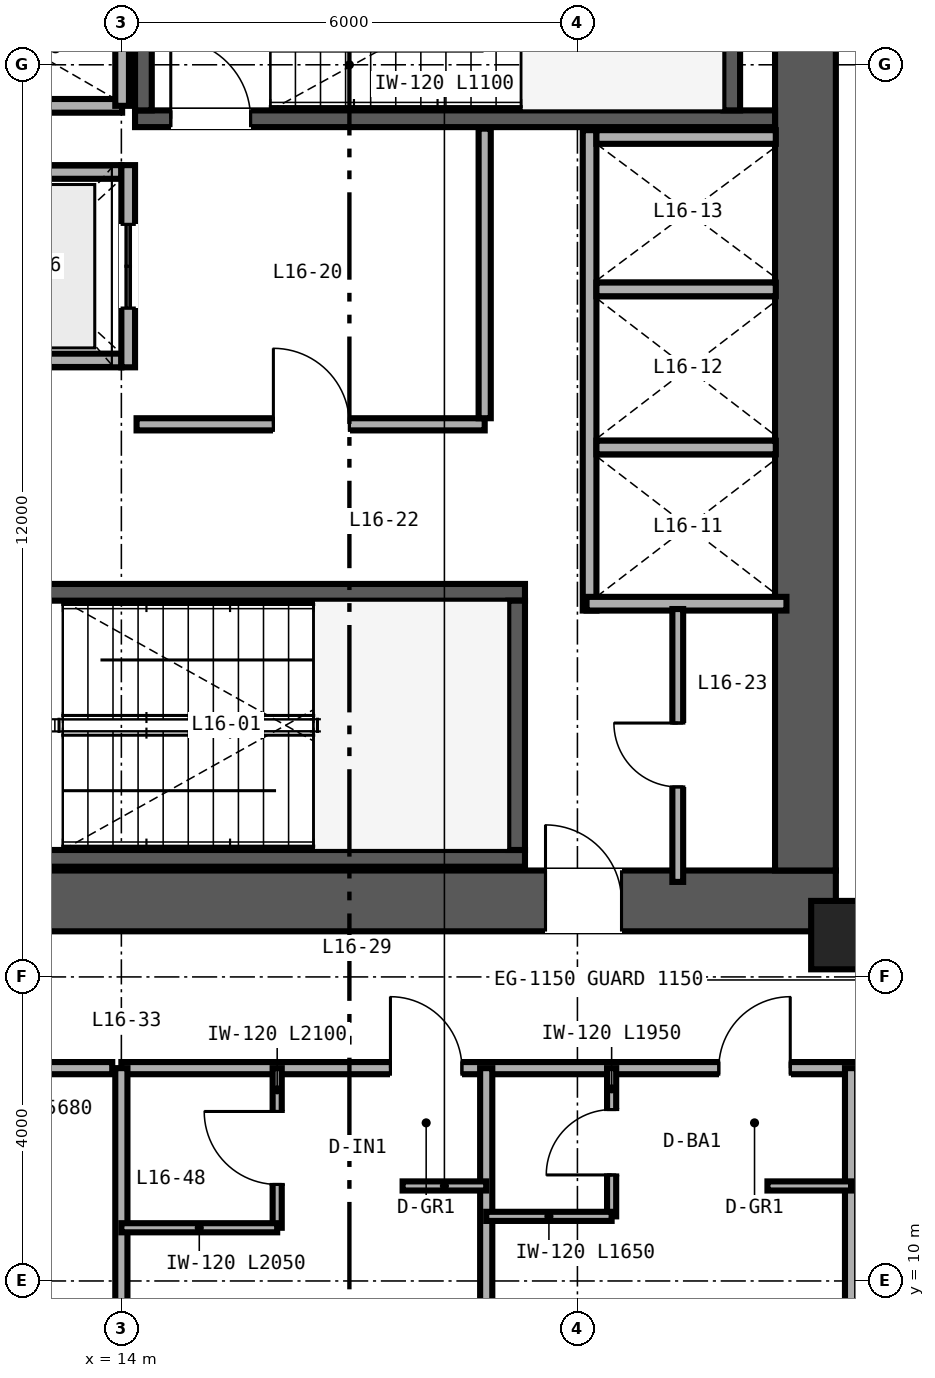
"""IFC4 building model, lengths in metres.
Left out: names, types, materials, properties, quantities, classifications, styles, units other than length and angle.
Written with IfcOpenShell. Run it as: python <this file> out.ifc"""

import sys

from ifc_helpers import new_model, si_unit, direction, frame, frame_2d, origin, origin_2d, place, context, subcontext, project, spatial, rectangle, hollow_rectangle, extrude, source, transform, mapped, element, fill, save


model = new_model("IFC4")
c1 = context("Model", 3, precision=1e-05, world=origin(), true_north=direction((0.0, 1.0)))
c2 = subcontext(c1, "Body", "Model", "MODEL_VIEW")
j1 = project(units=[si_unit("LENGTHUNIT", "METRE"), si_unit("PLANEANGLEUNIT", "RADIAN")], contexts=[c1])
p1 = place(None, origin())
s1 = spatial("IfcSite", under=j1, at=p1, CompositionType="ELEMENT")
p2 = place(p1, origin())
s2 = spatial("IfcBuilding", under=s1, at=p2, CompositionType="ELEMENT")
p3 = place(p2, frame((0.0, 0.0, 67.2)))
s3 = spatial("IfcBuildingStorey", under=s2, at=p3, CompositionType="ELEMENT", Elevation=67.2)
p4 = place(p3, frame((10.6, 15.0, 0.0), z_axis=(0.0, 0.0, 1.0), x_axis=(1.0, 0.0, 0.0)))
e1 = element("IfcWall", 1, at=p4, inside=s3, PredefinedType="SHEAR", context=c2, shape_type="SweptSolid", body=[
    extrude(rectangle(XDim=12.8, YDim=0.8, at=frame_2d((6.4, 0.0))), origin(), (0.0, 0.0, 1.0), 3.35),
])
p5 = place(p4, frame((8.98, 0.0, 0.0)))
e2 = element("IfcOpeningElement", 2, at=p5, cuts=e1, PredefinedType="OPENING", context=c2, shape_type="SweptSolid", body=[
    extrude(rectangle(XDim=1.0, YDim=2.15, at=frame_2d((0.5, 1.075))), frame((0.0, 0.41, 0.0), z_axis=(0.0, -1.0, 0.0), x_axis=(1.0, 0.0, 0.0)), (0.0, 0.0, 1.0), 0.82),
])
p6 = place(p3, frame((23.0, 15.4, 0.0), z_axis=(0.0, 0.0, 1.0), x_axis=(0.0, 1.0, 0.0)))
e3 = element("IfcWall", 3, at=p6, inside=s3, PredefinedType="SHEAR", context=c2, shape_type="SweptSolid", body=[
    extrude(rectangle(XDim=21.2, YDim=0.8, at=frame_2d((10.6, 0.0))), origin(), (0.0, 0.0, 1.0), 3.35),
])
p7 = place(p3, frame((11.4, 15.56, 0.0), z_axis=(0.0, 0.0, 1.0), x_axis=(1.0, 0.0, 0.0)))
e4 = element("IfcWall", 4, at=p7, inside=s3, PredefinedType="SHEAR", context=c2, shape_type="SweptSolid", body=[
    extrude(rectangle(XDim=7.91, YDim=0.22, at=frame_2d((3.955, 0.0))), origin(), (0.0, 0.0, 1.0), 3.4),
])
p8 = place(p3, frame((11.4, 19.06, 0.0), z_axis=(0.0, 0.0, 1.0), x_axis=(1.0, 0.0, 0.0)))
e5 = element("IfcWall", 5, at=p8, inside=s3, PredefinedType="SHEAR", context=c2, shape_type="SweptSolid", body=[
    extrude(rectangle(XDim=7.91, YDim=0.22, at=frame_2d((3.955, 0.0))), origin(), (0.0, 0.0, 1.0), 3.4),
])
p9 = place(p8, frame((0.52, 0.0, 0.0)))
e6 = element("IfcOpeningElement", 6, at=p9, cuts=e5, PredefinedType="OPENING", context=c2, shape_type="SweptSolid", body=[
    extrude(rectangle(XDim=1.05, YDim=2.15, at=frame_2d((0.525, 1.075))), frame((0.0, 0.12, 0.0), z_axis=(0.0, -1.0, 0.0), x_axis=(1.0, 0.0, 0.0)), (0.0, 0.0, 1.0), 0.24),
])
p10 = place(p3, frame((19.2, 15.67, 0.0), z_axis=(0.0, 0.0, 1.0), x_axis=(0.0, 1.0, 0.0)))
e7 = element("IfcWall", 7, at=p10, inside=s3, PredefinedType="SHEAR", context=c2, shape_type="SweptSolid", body=[
    extrude(rectangle(XDim=3.28, YDim=0.22, at=frame_2d((1.64, 0.0))), origin(), (0.0, 0.0, 1.0), 3.4),
])
p11 = place(p3, frame((14.18, 25.29, 0.0), z_axis=(0.0, 0.0, 1.0), x_axis=(1.0, 0.0, 0.0)))
e8 = element("IfcWall", 8, at=p11, inside=s3, PredefinedType="SHEAR", context=c2, shape_type="SweptSolid", body=[
    extrude(rectangle(XDim=8.42, YDim=0.22, at=frame_2d((4.21, 0.0))), origin(), (0.0, 0.0, 1.0), 3.4),
])
p12 = place(p11, frame((0.47, 0.0, 0.0)))
e9 = element("IfcOpeningElement", 9, at=p12, cuts=e8, PredefinedType="OPENING", context=c2, shape_type="SweptSolid", body=[
    extrude(rectangle(XDim=1.05, YDim=2.15, at=frame_2d((0.525, 1.075))), frame((0.0, 0.12, 0.0), z_axis=(0.0, -1.0, 0.0), x_axis=(1.0, 0.0, 0.0)), (0.0, 0.0, 1.0), 0.24),
])
for number, where, z_axis, x_axis in (
    (10, (14.29, 25.4, 0.0), (0.0, 0.0, 1.0), (0.0, 1.0, 0.0)),
    (11, (22.03, 25.4, 0.0), (0.0, 0.0, 1.0), (0.0, 1.0, 0.0)),
):
    element("IfcWall", number, at=place(p3, frame(where, z_axis=z_axis, x_axis=x_axis)), inside=s3, PredefinedType="SHEAR", context=c2, shape_type="SweptSolid", body=[
        extrude(rectangle(XDim=3.28, YDim=0.22, at=frame_2d((1.64, 0.0))), origin(), (0.0, 0.0, 1.0), 3.4),
    ])
m1 = source(origin(), c2, "Body", "SweptSolid", [
    extrude(hollow_rectangle(XDim=0.85, YDim=0.9, WallThickness=0.04, at=origin_2d()), origin(), (0.0, 0.0, 1.0), 3.35),
])
p13 = place(p3, frame((23.5, 14.55, 0.0), z_axis=(0.0, 0.0, 1.0), x_axis=(1.0, 0.0, 0.0)))
e12 = element("IfcColumn", 12, at=p13, inside=s3, PredefinedType="COLUMN", context=c2, shape_type="MappedRepresentation", body=[
    mapped(m1, transform((0.0, 0.0, 0.0), scale=1.0)),
])
p14 = place(p3, frame((20.16, 18.82, 0.0), z_axis=(0.0, 0.0, 1.0), x_axis=(0.0, 1.0, 0.0)))
e13 = element("IfcWall", 13, at=p14, inside=s3, PredefinedType="SOLIDWALL", context=c2, shape_type="SweptSolid", body=[
    extrude(rectangle(XDim=6.32, YDim=0.18, at=frame_2d((3.16, 0.0))), origin(), (0.0, 0.0, 1.0), 2.36),
])
p15 = place(p3, frame((20.12, 18.91, 0.0), z_axis=(0.0, 0.0, 1.0), x_axis=(1.0, 0.0, 0.0)))
e14 = element("IfcWall", 14, at=p15, inside=s3, PredefinedType="SOLIDWALL", context=c2, shape_type="SweptSolid", body=[
    extrude(rectangle(XDim=2.63, YDim=0.18, at=frame_2d((1.315, 0.0))), origin(), (0.0, 0.0, 1.0), 3.35),
])
p16 = place(p3, frame((20.25, 25.05, 0.0), z_axis=(0.0, 0.0, 1.0), x_axis=(1.0, 0.0, 0.0)))
e15 = element("IfcWall", 15, at=p16, inside=s3, PredefinedType="SOLIDWALL", context=c2, shape_type="SweptSolid", body=[
    extrude(rectangle(XDim=2.36, YDim=0.18, at=frame_2d((1.18, 0.0))), origin(), (0.0, 0.0, 1.0), 3.35),
])
p17 = place(p3, frame((20.25, 20.965, 0.0), z_axis=(0.0, 0.0, 1.0), x_axis=(1.0, 0.0, 0.0)))
e16 = element("IfcWall", 16, at=p17, inside=s3, PredefinedType="SOLIDWALL", context=c2, shape_type="SweptSolid", body=[
    extrude(rectangle(XDim=2.36, YDim=0.18, at=frame_2d((1.18, 0.0))), origin(), (0.0, 0.0, 1.0), 2.36),
])
p18 = place(p3, frame((20.25, 23.045, 0.0), z_axis=(0.0, 0.0, 1.0), x_axis=(1.0, 0.0, 0.0)))
e17 = element("IfcWall", 17, at=p18, inside=s3, PredefinedType="SOLIDWALL", context=c2, shape_type="SweptSolid", body=[
    extrude(rectangle(XDim=2.36, YDim=0.18, at=frame_2d((1.18, 0.0))), origin(), (0.0, 0.0, 1.0), 3.35),
])
for number, where, z_axis, x_axis in (
    (18, (11.5, 22.11, 0.0), (0.0, 0.0, 1.0), (1.0, 0.0, 0.0)),
    (19, (11.5, 24.59, 0.0), (0.0, 0.0, 1.0), (1.0, 0.0, 0.0)),
):
    element("IfcWall", number, at=place(p3, frame(where, z_axis=z_axis, x_axis=x_axis)), inside=s3, PredefinedType="SOLIDWALL", context=c2, shape_type="SweptSolid", body=[
        extrude(rectangle(XDim=2.5, YDim=0.18, at=frame_2d((1.25, 0.0))), origin(), (0.0, 0.0, 1.0), 3.35),
    ])
p19 = place(p3, frame((14.09, 22.02, 0.0), z_axis=(0.0, 0.0, 1.0), x_axis=(0.0, 1.0, 0.0)))
e20 = element("IfcWall", 20, at=p19, inside=s3, PredefinedType="SOLIDWALL", context=c2, shape_type="SweptSolid", body=[
    extrude(rectangle(XDim=2.66, YDim=0.18, at=frame_2d((1.33, 0.0))), origin(), (0.0, 0.0, 1.0), 3.35),
])
p20 = place(p19, frame((0.78, 0.0, 0.0)))
e21 = element("IfcOpeningElement", 21, at=p20, cuts=e20, PredefinedType="OPENING", context=c2, shape_type="SweptSolid", body=[
    extrude(rectangle(XDim=1.1, YDim=2.2, at=frame_2d((0.55, 1.1))), frame((0.0, 0.1, 0.0), z_axis=(0.0, -1.0, 0.0), x_axis=(1.0, 0.0, 0.0)), (0.0, 0.0, 1.0), 0.2),
])
p21 = place(p3, frame((11.5, 25.46, 0.0), z_axis=(0.0, 0.0, 1.0), x_axis=(1.0, 0.0, 0.0)))
e22 = element("IfcWall", 22, at=p21, inside=s3, PredefinedType="SOLIDWALL", context=c2, shape_type="SweptSolid", body=[
    extrude(rectangle(XDim=2.51, YDim=0.18, at=frame_2d((1.255, 0.0))), origin(), (0.0, 0.0, 1.0), 3.35),
])
p22 = place(p3, frame((14.01, 25.46, 0.0), z_axis=(0.0, 0.0, 1.0), x_axis=(0.0, 1.0, 0.0)))
e23 = element("IfcWall", 23, at=p22, inside=s3, PredefinedType="SOLIDWALL", context=c2, shape_type="SweptSolid", body=[
    extrude(rectangle(XDim=3.08, YDim=0.18, at=frame_2d((1.54, 0.0))), origin(), (0.0, 0.0, 1.0), 3.35),
])
p23 = place(p3, frame((14.2, 21.27, 0.0), z_axis=(0.0, 0.0, 1.0), x_axis=(1.0, 0.0, 0.0)))
e24 = element("IfcWall", 24, at=p23, inside=s3, PredefinedType="PARTITIONING", context=c2, shape_type="SweptSolid", body=[
    extrude(rectangle(XDim=4.58, YDim=0.16, at=frame_2d((2.29, 0.0))), origin(), (0.0, 0.0, 1.0), 3.35),
])
p24 = place(p23, frame((1.8, 0.0, 0.0)))
e25 = element("IfcOpeningElement", 25, at=p24, cuts=e24, PredefinedType="OPENING", context=c2, shape_type="SweptSolid", body=[
    extrude(rectangle(XDim=1.0, YDim=2.15, at=frame_2d((0.5, 1.075))), frame((0.0, 0.09, 0.0), z_axis=(0.0, -1.0, 0.0), x_axis=(1.0, 0.0, 0.0)), (0.0, 0.0, 1.0), 0.18),
])
p25 = place(p3, frame((18.78, 21.35, 0.0), z_axis=(0.0, 0.0, 1.0), x_axis=(0.0, 1.0, 0.0)))
e26 = element("IfcWall", 26, at=p25, inside=s3, PredefinedType="PARTITIONING", context=c2, shape_type="SweptSolid", body=[
    extrude(rectangle(XDim=3.81, YDim=0.16, at=frame_2d((1.905, 0.0))), origin(), (0.0, 0.0, 1.0), 3.35),
])
p26 = place(p3, frame((21.32, 15.25, 0.0), z_axis=(0.0, 0.0, 1.0), x_axis=(0.0, 1.0, 0.0)))
e27 = element("IfcWall", 27, at=p26, inside=s3, PredefinedType="PARTITIONING", context=c2, shape_type="SweptSolid", body=[
    extrude(rectangle(XDim=3.59, YDim=0.142, at=frame_2d((1.795, 0.0))), origin(), (0.0, 0.0, 1.0), 3.35),
])
p27 = place(p26, frame((1.25, 0.0, 0.0)))
e28 = element("IfcOpeningElement", 28, at=p27, cuts=e27, PredefinedType="OPENING", context=c2, shape_type="SweptSolid", body=[
    extrude(rectangle(XDim=0.84, YDim=2.1, at=frame_2d((0.42, 1.05))), frame((0.0, 0.081, 0.0), z_axis=(0.0, -1.0, 0.0), x_axis=(1.0, 0.0, 0.0)), (0.0, 0.0, 1.0), 0.162),
])
p28 = place(p3, frame((8.2, 12.8, 0.0), z_axis=(0.0, 0.0, 1.0), x_axis=(1.0, 0.0, 0.0)))
e29 = element("IfcWall", 29, at=p28, inside=s3, PredefinedType="PARTITIONING", context=c2, shape_type="SweptSolid", body=[
    extrude(rectangle(XDim=5.68, YDim=0.16, at=frame_2d((2.84, 0.0))), origin(), (0.0, 0.0, 1.0), 3.35),
])
p29 = place(p28, frame((2.36, 0.0, 0.0)))
e30 = element("IfcOpeningElement", 30, at=p29, cuts=e29, PredefinedType="OPENING", context=c2, shape_type="SweptSolid", body=[
    extrude(rectangle(XDim=0.96, YDim=2.15, at=frame_2d((0.48, 1.075))), frame((0.0, 0.09, 0.0), z_axis=(0.0, -1.0, 0.0), x_axis=(1.0, 0.0, 0.0)), (0.0, 0.0, 1.0), 0.18),
])
p30 = place(p3, frame((14.0, 12.8, 0.0), z_axis=(0.0, 0.0, 1.0), x_axis=(1.0, 0.0, 0.0)))
e31 = element("IfcWall", 31, at=p30, inside=s3, PredefinedType="PARTITIONING", context=c2, shape_type="SweptSolid", body=[
    extrude(rectangle(XDim=36.0, YDim=0.16, at=frame_2d((18.0, 0.0))), origin(), (0.0, 0.0, 1.0), 2.571),
])
p31 = place(p30, frame((3.54, 0.0, 0.0)))
e32 = element("IfcOpeningElement", 32, at=p31, cuts=e31, PredefinedType="OPENING", context=c2, shape_type="SweptSolid", body=[
    extrude(rectangle(XDim=0.94, YDim=2.15, at=frame_2d((0.47, 1.075))), frame((0.0, 0.09, 0.0), z_axis=(0.0, -1.0, 0.0), x_axis=(1.0, 0.0, 0.0)), (0.0, 0.0, 1.0), 0.18),
])
p32 = place(p30, frame((7.86, 0.0, 0.0)))
e33 = element("IfcOpeningElement", 33, at=p32, cuts=e31, PredefinedType="OPENING", context=c2, shape_type="SweptSolid", body=[
    extrude(rectangle(XDim=0.94, YDim=2.15, at=frame_2d((0.47, 1.075))), frame((0.0, 0.09, 0.0), z_axis=(0.0, -1.0, 0.0), x_axis=(1.0, 0.0, 0.0)), (0.0, 0.0, 1.0), 0.18),
])
p33 = place(p30, frame((11.92, 0.0, 0.0)))
e34 = element("IfcOpeningElement", 34, at=p33, cuts=e31, PredefinedType="OPENING", context=c2, shape_type="SweptSolid", body=[
    extrude(rectangle(XDim=0.96, YDim=2.15, at=frame_2d((0.48, 1.075))), frame((0.0, 0.09, 0.0), z_axis=(0.0, -1.0, 0.0), x_axis=(1.0, 0.0, 0.0)), (0.0, 0.0, 1.0), 0.18),
])
p34 = place(p30, frame((17.52, 0.0, 0.0)))
e35 = element("IfcOpeningElement", 35, at=p34, cuts=e31, PredefinedType="OPENING", context=c2, shape_type="SweptSolid", body=[
    extrude(rectangle(XDim=0.96, YDim=2.15, at=frame_2d((0.48, 1.075))), frame((0.0, 0.09, 0.0), z_axis=(0.0, -1.0, 0.0), x_axis=(1.0, 0.0, 0.0)), (0.0, 0.0, 1.0), 0.18),
])
p35 = place(p30, frame((24.74, 0.0, 0.0)))
e36 = element("IfcOpeningElement", 36, at=p35, cuts=e31, PredefinedType="OPENING", context=c2, shape_type="SweptSolid", body=[
    extrude(rectangle(XDim=0.94, YDim=2.15, at=frame_2d((0.47, 1.075))), frame((0.0, 0.09, 0.0), z_axis=(0.0, -1.0, 0.0), x_axis=(1.0, 0.0, 0.0)), (0.0, 0.0, 1.0), 0.18),
])
p36 = place(p30, frame((29.74, 0.0, 0.0)))
e37 = element("IfcOpeningElement", 37, at=p36, cuts=e31, PredefinedType="OPENING", context=c2, shape_type="SweptSolid", body=[
    extrude(rectangle(XDim=0.94, YDim=2.15, at=frame_2d((0.47, 1.075))), frame((0.0, 0.09, 0.0), z_axis=(0.0, -1.0, 0.0), x_axis=(1.0, 0.0, 0.0)), (0.0, 0.0, 1.0), 0.18),
])
p37 = place(p30, frame((33.02, 0.0, 0.0)))
e38 = element("IfcOpeningElement", 38, at=p37, cuts=e31, PredefinedType="OPENING", context=c2, shape_type="SweptSolid", body=[
    extrude(rectangle(XDim=0.96, YDim=2.15, at=frame_2d((0.48, 1.075))), frame((0.0, 0.09, 0.0), z_axis=(0.0, -1.0, 0.0), x_axis=(1.0, 0.0, 0.0)), (0.0, 0.0, 1.0), 0.18),
])
for number, where, z_axis, x_axis in (
    (39, (14.0, 2.36, 0.0), (0.0, 0.0, 1.0), (0.0, 1.0, 0.0)),
    (40, (18.8, 2.36, 0.0), (0.0, 0.0, 1.0), (0.0, 1.0, 0.0)),
):
    element("IfcWall", number, at=place(p3, frame(where, z_axis=z_axis, x_axis=x_axis)), inside=s3, PredefinedType="PARTITIONING", context=c2, shape_type="SweptSolid", body=[
        extrude(rectangle(XDim=10.44, YDim=0.16, at=frame_2d((5.22, 0.0))), origin(), (0.0, 0.0, 1.0), 2.657),
    ])
p38 = place(p3, frame((16.05, 10.7, 0.0), z_axis=(0.0, 0.0, 1.0), x_axis=(0.0, 1.0, 0.0)))
e41 = element("IfcWall", 41, at=p38, inside=s3, PredefinedType="PARTITIONING", context=c2, shape_type="SweptSolid", body=[
    extrude(rectangle(XDim=2.1, YDim=0.12, at=frame_2d((1.05, 0.0))), origin(), (0.0, 0.0, 1.0), 3.35),
])
p39 = place(p38, frame((0.57, 0.0, 0.0)))
e42 = element("IfcOpeningElement", 42, at=p39, cuts=e41, PredefinedType="OPENING", context=c2, shape_type="SweptSolid", body=[
    extrude(rectangle(XDim=0.96, YDim=2.15, at=frame_2d((0.48, 1.075))), frame((0.0, 0.07, 0.0), z_axis=(0.0, -1.0, 0.0), x_axis=(1.0, 0.0, 0.0)), (0.0, 0.0, 1.0), 0.14),
])
p40 = place(p3, frame((14.0, 10.7, 0.0), z_axis=(0.0, 0.0, 1.0), x_axis=(1.0, 0.0, 0.0)))
e43 = element("IfcWall", 43, at=p40, inside=s3, PredefinedType="PARTITIONING", context=c2, shape_type="SweptSolid", body=[
    extrude(rectangle(XDim=2.05, YDim=0.12, at=frame_2d((1.025, 0.0))), origin(), (0.0, 0.0, 1.0), 3.35),
])
p41 = place(p3, frame((17.7, 11.25, 0.0), z_axis=(0.0, 0.0, 1.0), x_axis=(1.0, 0.0, 0.0)))
e44 = element("IfcWall", 44, at=p41, inside=s3, PredefinedType="PARTITIONING", context=c2, shape_type="SweptSolid", body=[
    extrude(rectangle(XDim=1.1, YDim=0.12, at=frame_2d((0.55, 0.0))), origin(), (0.0, 0.0, 1.0), 3.35),
])
p42 = place(p3, frame((23.6, 2.36, 0.0), z_axis=(0.0, 0.0, 1.0), x_axis=(0.0, 1.0, 0.0)))
e45 = element("IfcWall", 45, at=p42, inside=s3, PredefinedType="PARTITIONING", context=c2, shape_type="SweptSolid", body=[
    extrude(rectangle(XDim=10.44, YDim=0.16, at=frame_2d((5.22, 0.0))), origin(), (0.0, 0.0, 1.0), 2.423),
])
p43 = place(p3, frame((20.45, 10.85, 0.0), z_axis=(0.0, 0.0, 1.0), x_axis=(0.0, 1.0, 0.0)))
e46 = element("IfcWall", 46, at=p43, inside=s3, PredefinedType="PARTITIONING", context=c2, shape_type="SweptSolid", body=[
    extrude(rectangle(XDim=1.95, YDim=0.12, at=frame_2d((0.975, 0.0))), origin(), (0.0, 0.0, 1.0), 3.35),
])
p44 = place(p43, frame((0.545, 0.0, 0.0)))
e47 = element("IfcOpeningElement", 47, at=p44, cuts=e46, PredefinedType="OPENING", context=c2, shape_type="SweptSolid", body=[
    extrude(rectangle(XDim=0.86, YDim=2.1, at=frame_2d((0.43, 1.05))), frame((0.0, 0.07, 0.0), z_axis=(0.0, -1.0, 0.0), x_axis=(1.0, 0.0, 0.0)), (0.0, 0.0, 1.0), 0.14),
])
p45 = place(p3, frame((18.8, 10.85, 0.0), z_axis=(0.0, 0.0, 1.0), x_axis=(1.0, 0.0, 0.0)))
e48 = element("IfcWall", 48, at=p45, inside=s3, PredefinedType="PARTITIONING", context=c2, shape_type="SweptSolid", body=[
    extrude(rectangle(XDim=1.65, YDim=0.12, at=frame_2d((0.825, 0.0))), origin(), (0.0, 0.0, 1.0), 3.35),
])
p46 = place(p3, frame((22.5, 11.25, 0.0), z_axis=(0.0, 0.0, 1.0), x_axis=(1.0, 0.0, 0.0)))
e49 = element("IfcWall", 49, at=p46, inside=s3, PredefinedType="PARTITIONING", context=c2, shape_type="SweptSolid", body=[
    extrude(rectangle(XDim=1.1, YDim=0.12, at=frame_2d((0.55, 0.0))), origin(), (0.0, 0.0, 1.0), 2.571),
])
m2 = source(origin(), c2, "Body", "SweptSolid", [
    extrude(rectangle(XDim=1.05, YDim=2.15, at=frame_2d((0.525, 1.075))), frame((0.0, 0.025, 0.0), z_axis=(0.0, -1.0, 0.0), x_axis=(1.0, 0.0, 0.0)), (0.0, 0.0, 1.0), 0.05),
])
p47 = place(p12, origin())
e50 = element("IfcDoor", 50, at=p47, inside=s3, OperationType="SINGLE_SWING_LEFT", PredefinedType="DOOR", context=c2, shape_type="MappedRepresentation", body=[
    mapped(m2, transform((0.0, 0.0, 0.0), scale=1.0)),
])
fill(e9, e50)
m3 = source(origin(), c2, "Body", "SweptSolid", [
    extrude(rectangle(XDim=1.1, YDim=2.2, at=frame_2d((0.55, 1.1))), frame((0.0, 0.025, 0.0), z_axis=(0.0, -1.0, 0.0), x_axis=(1.0, 0.0, 0.0)), (0.0, 0.0, 1.0), 0.05),
])
p48 = place(p20, origin())
e51 = element("IfcDoor", 51, at=p48, inside=s3, OperationType="DOUBLE_DOOR_SLIDING", PredefinedType="DOOR", context=c2, shape_type="MappedRepresentation", body=[
    mapped(m3, transform((0.0, 0.0, 0.0), scale=1.0)),
])
fill(e21, e51)
m4 = source(origin(), c2, "Body", "SweptSolid", [
    extrude(rectangle(XDim=1.0, YDim=2.15, at=frame_2d((0.5, 1.075))), frame((0.0, 0.025, 0.0), z_axis=(0.0, -1.0, 0.0), x_axis=(1.0, 0.0, 0.0)), (0.0, 0.0, 1.0), 0.05),
])
p49 = place(p24, origin())
e52 = element("IfcDoor", 52, at=p49, inside=s3, OperationType="SINGLE_SWING_LEFT", PredefinedType="DOOR", context=c2, shape_type="MappedRepresentation", body=[
    mapped(m4, transform((0.0, 0.0, 0.0), scale=1.0)),
])
fill(e25, e52)
m5 = source(origin(), c2, "Body", "SweptSolid", [
    extrude(rectangle(XDim=0.84, YDim=2.1, at=frame_2d((0.42, 1.05))), frame((0.0, 0.025, 0.0), z_axis=(0.0, -1.0, 0.0), x_axis=(1.0, 0.0, 0.0)), (0.0, 0.0, 1.0), 0.05),
])
p50 = place(p27, origin())
e53 = element("IfcDoor", 53, at=p50, inside=s3, OperationType="SINGLE_SWING_RIGHT", PredefinedType="DOOR", context=c2, shape_type="MappedRepresentation", body=[
    mapped(m5, transform((0.0, 0.0, 0.0), scale=1.0)),
])
fill(e28, e53)
p51 = place(p5, origin())
e54 = element("IfcDoor", 54, at=p51, inside=s3, OperationType="SINGLE_SWING_LEFT", PredefinedType="DOOR", context=c2, shape_type="MappedRepresentation", body=[
    mapped(m4, transform((0.0, 0.0, 0.0), scale=1.0)),
])
fill(e2, e54)
m6 = source(origin(), c2, "Body", "SweptSolid", [
    extrude(rectangle(XDim=0.96, YDim=2.15, at=frame_2d((0.48, 1.075))), frame((0.0, 0.025, 0.0), z_axis=(0.0, -1.0, 0.0), x_axis=(1.0, 0.0, 0.0)), (0.0, 0.0, 1.0), 0.05),
])
p52 = place(p39, origin())
e55 = element("IfcDoor", 55, at=p52, inside=s3, OperationType="SINGLE_SWING_RIGHT", PredefinedType="DOOR", context=c2, shape_type="MappedRepresentation", body=[
    mapped(m6, transform((0.0, 0.0, 0.0), scale=1.0)),
])
fill(e42, e55)
m7 = source(origin(), c2, "Body", "SweptSolid", [
    extrude(rectangle(XDim=0.86, YDim=2.1, at=frame_2d((0.43, 1.05))), frame((0.0, 0.025, 0.0), z_axis=(0.0, -1.0, 0.0), x_axis=(1.0, 0.0, 0.0)), (0.0, 0.0, 1.0), 0.05),
])
p53 = place(p44, origin())
e56 = element("IfcDoor", 56, at=p53, inside=s3, OperationType="SINGLE_SWING_LEFT", PredefinedType="DOOR", context=c2, shape_type="MappedRepresentation", body=[
    mapped(m7, transform((0.0, 0.0, 0.0), scale=1.0)),
])
fill(e47, e56)
m8 = source(origin(), c2, "Body", "SweptSolid", [
    extrude(rectangle(XDim=0.94, YDim=2.15, at=frame_2d((0.47, 1.075))), frame((0.0, 0.025, 0.0), z_axis=(0.0, -1.0, 0.0), x_axis=(1.0, 0.0, 0.0)), (0.0, 0.0, 1.0), 0.05),
])
p54 = place(p31, origin())
e57 = element("IfcDoor", 57, at=p54, inside=s3, OperationType="SINGLE_SWING_LEFT", PredefinedType="DOOR", context=c2, shape_type="MappedRepresentation", body=[
    mapped(m8, transform((0.0, 0.0, 0.0), scale=1.0)),
])
fill(e32, e57)
p55 = place(p32, origin())
e58 = element("IfcDoor", 58, at=p55, inside=s3, OperationType="SINGLE_SWING_RIGHT", PredefinedType="DOOR", context=c2, shape_type="MappedRepresentation", body=[
    mapped(m8, transform((0.0, 0.0, 0.0), scale=1.0)),
])
fill(e33, e58)
save(model, sys.argv[1])
